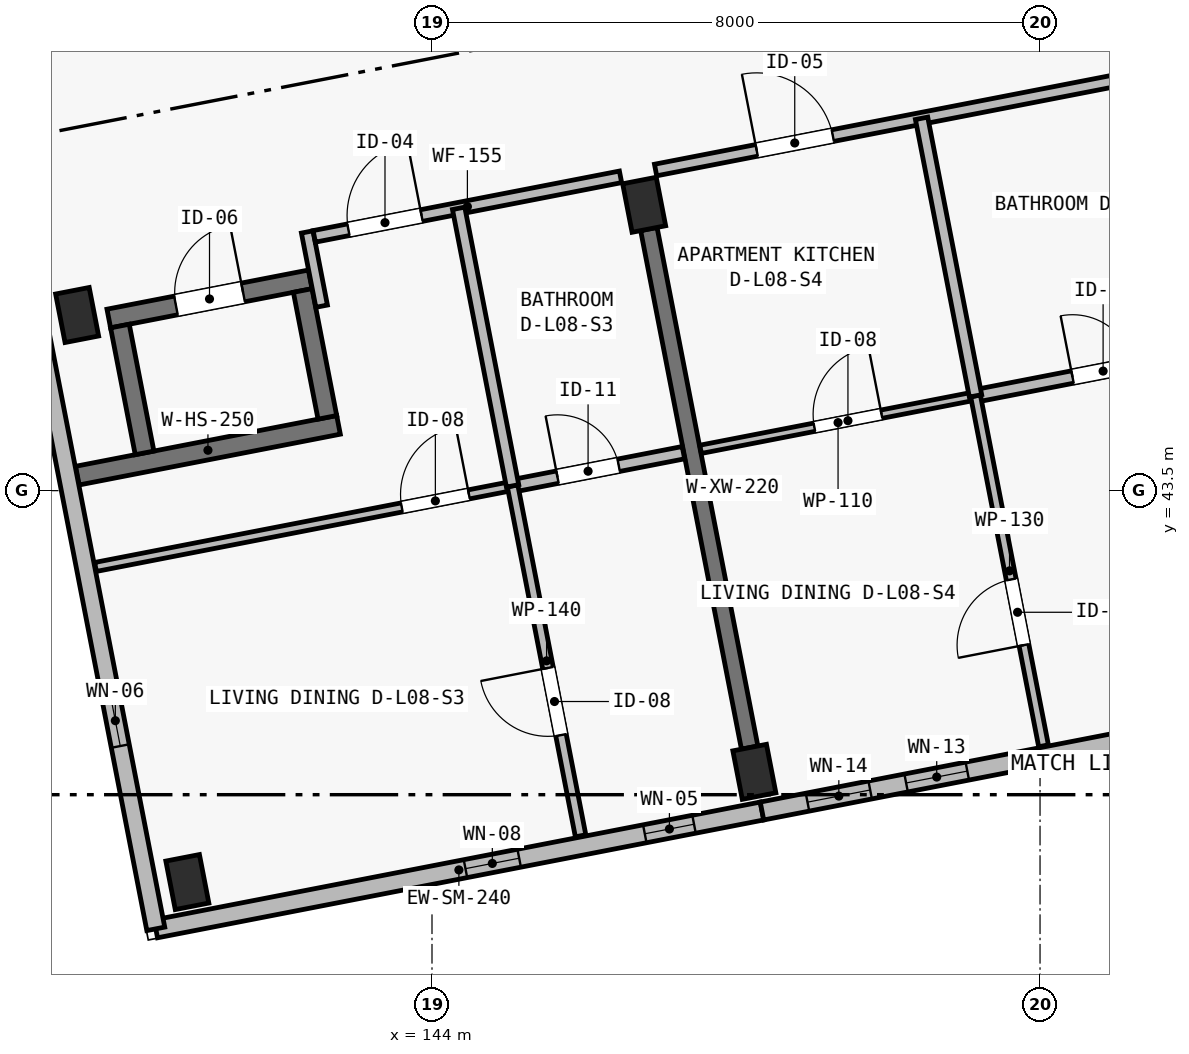
"""IFC4 building model, lengths in metres.
Left out: names, types, materials, properties, quantities, classifications, styles, units other than length and angle.
Written with IfcOpenShell. Run it as: python <this file> out.ifc"""

import sys

from ifc_helpers import new_model, si_unit, direction, frame, frame_2d, origin, origin_2d, place, context, subcontext, project, spatial, polyline, rectangle, outline, extrude, element, fill, save


model = new_model("IFC4")
c1 = context("Model", 3, precision=1e-05, world=origin(), true_north=direction((0.0, 1.0)))
c2 = subcontext(c1, "Body", "Model", "MODEL_VIEW")
j1 = project(units=[si_unit("LENGTHUNIT", "METRE"), si_unit("PLANEANGLEUNIT", "RADIAN")], contexts=[c1])
p1 = place(None, origin())
s1 = spatial("IfcSite", under=j1, at=p1, CompositionType="ELEMENT")
p2 = place(p1, origin())
s2 = spatial("IfcBuilding", under=s1, at=p2, CompositionType="ELEMENT")
p3 = place(p2, frame((0.0, 0.0, 27.9)))
s3 = spatial("IfcBuildingStorey", under=s2, at=p3, CompositionType="ELEMENT", Elevation=27.9)
for number, where, z_axis, x_axis in (
    (1, (140.781, 38.35, 0.0), (0.0, 0.0, 1.0), (0.982, 0.191, 0.0)),
    (2, (139.331, 45.811, 0.0), (0.0, 0.0, 1.0), (0.982, 0.191, 0.0)),
):
    element("IfcColumn", number, at=place(p3, frame(where, z_axis=z_axis, x_axis=x_axis)), inside=s3, PredefinedType="COLUMN", context=c2, shape_type="SweptSolid", body=[
        extrude(rectangle(XDim=0.45, YDim=0.65, at=origin_2d()), origin(), (0.0, 0.0, 1.0), 3.0),
    ])
for number, where, z_axis, x_axis in (
    (3, (148.241, 39.801, 0.0), (0.0, 0.0, 1.0), (0.982, 0.191, 0.0)),
    (4, (146.791, 47.261, 0.0), (0.0, 0.0, 1.0), (0.982, 0.191, 0.0)),
):
    element("IfcColumn", number, at=place(p3, frame(where, z_axis=z_axis, x_axis=x_axis)), inside=s3, PredefinedType="COLUMN", context=c2, shape_type="SweptSolid", body=[
        extrude(rectangle(XDim=0.45, YDim=0.65, at=origin_2d()), origin(), (0.0, 0.0, 1.0), 3.25),
    ])
p4 = place(p3, frame((148.179, 40.12, 0.0), z_axis=(0.0, 0.0, 1.0), x_axis=(-0.190817005532, 0.981625626397, 0.0)))
e5 = element("IfcWall", 5, at=p4, inside=s3, PredefinedType="SHEAR", context=c2, shape_type="SweptSolid", body=[
    extrude(rectangle(XDim=6.95, YDim=0.22, at=frame_2d((3.475, 0.0))), origin(), (0.0, 0.0, 1.0), 2.5),
])
p5 = place(p3, frame((139.334, 43.698, 0.0), z_axis=(0.0, 0.0, 1.0), x_axis=(0.981620834598, 0.190841654477, 0.0)))
e6 = element("IfcWall", 6, at=p5, inside=s3, PredefinedType="SHEAR", context=c2, shape_type="SweptSolid", body=[
    extrude(rectangle(XDim=3.5, YDim=0.25, at=frame_2d((1.75, 0.0))), origin(), (0.0, 0.0, 1.0), 3.183),
])
p6 = place(p3, frame((139.748, 45.764, 0.0), z_axis=(0.0, 0.0, 1.0), x_axis=(0.981630445883, 0.190792210834, 0.0)))
e7 = element("IfcWall", 7, at=p6, inside=s3, PredefinedType="SHEAR", context=c2, shape_type="SweptSolid", body=[
    extrude(rectangle(XDim=2.7, YDim=0.25, at=frame_2d((1.35, 0.0))), origin(), (0.0, 0.0, 1.0), 3.183),
])
p7 = place(p6, frame((0.9, 0.0, 0.0)))
e8 = element("IfcOpeningElement", 8, at=p7, cuts=e7, PredefinedType="OPENING", context=c2, shape_type="SweptSolid", body=[
    extrude(rectangle(XDim=0.9, YDim=2.05, at=frame_2d((0.45, 1.025))), frame((0.0, 0.14, 0.0), z_axis=(0.0, -1.0, 0.0), x_axis=(1.0, 0.0, 0.0)), (0.0, 0.0, 1.0), 0.28),
])
for number, where, z_axis, x_axis in (
    (9, (140.218, 43.997, 0.0), (0.0, 0.0, 1.0), (-0.191, 0.982, 0.0)),
    (10, (142.623, 44.464, 0.0), (0.0, 0.0, 1.0), (-0.191, 0.982, 0.0)),
):
    element("IfcWall", number, at=place(p3, frame(where, z_axis=z_axis, x_axis=x_axis)), inside=s3, PredefinedType="SHEAR", context=c2, shape_type="SweptSolid", body=[
        extrude(rectangle(XDim=1.7, YDim=0.25, at=frame_2d((0.85, 0.0))), origin(), (0.0, 0.0, 1.0), 3.183),
    ])
p8 = place(p3, frame((148.342, 39.285, 0.0), z_axis=(0.0, 0.0, 1.0), x_axis=(-0.981627273155, -0.190808533872, 0.0)))
e11 = element("IfcWall", 11, at=p8, inside=s3, PredefinedType="SOLIDWALL", context=c2, shape_type="SweptSolid", body=[
    extrude(outline(polyline([(0.0, 0.0), (8.125, 0.0), (8.125, 3.305), (0.0, 4.987), (0.0, 0.0)])), frame((0.0, 0.12, 0.0), z_axis=(0.0, -1.0, 0.0), x_axis=(1.0, 0.0, 0.0)), (0.0, 0.0, 1.0), 0.24),
])
p9 = place(p8, frame((0.911, 0.0, 0.52)))
e12 = element("IfcOpeningElement", 12, at=p9, cuts=e11, PredefinedType="OPENING", context=c2, shape_type="SweptSolid", body=[
    extrude(rectangle(XDim=0.66, YDim=2.32, at=frame_2d((0.33, 1.16))), frame((0.0, 0.135, 0.0), z_axis=(0.0, -1.0, 0.0), x_axis=(1.0, 0.0, 0.0)), (0.0, 0.0, 1.0), 0.27),
])
p10 = place(p8, frame((3.254, 0.0, 0.52)))
e13 = element("IfcOpeningElement", 13, at=p10, cuts=e11, PredefinedType="OPENING", context=c2, shape_type="SweptSolid", body=[
    extrude(rectangle(XDim=0.72, YDim=2.16, at=frame_2d((0.36, 1.08))), frame((0.0, 0.135, 0.0), z_axis=(0.0, -1.0, 0.0), x_axis=(1.0, 0.0, 0.0)), (0.0, 0.0, 1.0), 0.27),
])
p11 = place(p3, frame((155.802, 40.735, 0.0), z_axis=(0.0, 0.0, 1.0), x_axis=(-0.981626422232, -0.190812911449, 0.0)))
e14 = element("IfcWall", 14, at=p11, inside=s3, PredefinedType="SOLIDWALL", context=c2, shape_type="SweptSolid", body=[
    extrude(outline(polyline([(0.0, 0.0), (7.6, 0.0), (7.6, 4.987), (0.0, 6.56), (0.0, 0.0)])), frame((0.0, 0.12, 0.0), z_axis=(0.0, -1.0, 0.0), x_axis=(1.0, 0.0, 0.0)), (0.0, 0.0, 1.0), 0.24),
])
p12 = place(p11, frame((0.82, 0.0, 0.42)))
e15 = element("IfcOpeningElement", 15, at=p12, cuts=e14, PredefinedType="OPENING", context=c2, shape_type="SweptSolid", body=[
    extrude(rectangle(XDim=0.76, YDim=2.34, at=frame_2d((0.38, 1.17))), frame((0.0, 0.135, 0.0), z_axis=(0.0, -1.0, 0.0), x_axis=(1.0, 0.0, 0.0)), (0.0, 0.0, 1.0), 0.27),
])
p13 = place(p11, frame((4.848, 0.0, 0.42)))
e16 = element("IfcOpeningElement", 16, at=p13, cuts=e14, PredefinedType="OPENING", context=c2, shape_type="SweptSolid", body=[
    extrude(rectangle(XDim=0.82, YDim=2.18, at=frame_2d((0.41, 1.09))), frame((0.0, 0.135, 0.0), z_axis=(0.0, -1.0, 0.0), x_axis=(1.0, 0.0, 0.0)), (0.0, 0.0, 1.0), 0.27),
])
p14 = place(p11, frame((6.15, 0.0, 0.48)))
e17 = element("IfcOpeningElement", 17, at=p14, cuts=e14, PredefinedType="OPENING", context=c2, shape_type="SweptSolid", body=[
    extrude(rectangle(XDim=0.84, YDim=2.28, at=frame_2d((0.42, 1.14))), frame((0.0, 0.135, 0.0), z_axis=(0.0, -1.0, 0.0), x_axis=(1.0, 0.0, 0.0)), (0.0, 0.0, 1.0), 0.27),
])
p15 = place(p3, frame((140.366, 37.735, 0.0), z_axis=(0.0, 0.0, 1.0), x_axis=(-0.190806686307, 0.981627632282, 0.0)))
e18 = element("IfcWall", 18, at=p15, inside=s3, PredefinedType="SOLIDWALL", context=c2, shape_type="SweptSolid", body=[
    extrude(rectangle(XDim=20.65, YDim=0.24, at=frame_2d((10.325, 0.0))), origin(), (0.0, 0.0, 1.0), 3.305),
])
p16 = place(p15, frame((2.45, 0.0, 0.45)))
e19 = element("IfcOpeningElement", 19, at=p16, cuts=e18, PredefinedType="OPENING", context=c2, shape_type="SweptSolid", body=[
    extrude(rectangle(XDim=0.68, YDim=2.24, at=frame_2d((0.34, 1.12))), frame((0.0, 0.135, 0.0), z_axis=(0.0, -1.0, 0.0), x_axis=(1.0, 0.0, 0.0)), (0.0, 0.0, 1.0), 0.27),
])
p17 = place(p15, frame((17.38, 0.0, 0.52)))
e20 = element("IfcOpeningElement", 20, at=p17, cuts=e18, PredefinedType="OPENING", context=c2, shape_type="SweptSolid", body=[
    extrude(rectangle(XDim=0.82, YDim=2.18, at=frame_2d((0.41, 1.09))), frame((0.0, 0.135, 0.0), z_axis=(0.0, -1.0, 0.0), x_axis=(1.0, 0.0, 0.0)), (0.0, 0.0, 1.0), 0.27),
])
p18 = place(p3, frame((142.548, 45.927, 0.0), z_axis=(0.0, 0.0, 1.0), x_axis=(-0.190639805817, 0.981660055436, 0.0)))
e21 = element("IfcWall", 21, at=p18, inside=s3, PredefinedType="PARTITIONING", context=c2, shape_type="SweptSolid", body=[
    extrude(rectangle(XDim=0.995, YDim=0.155, at=frame_2d((0.498, 0.0))), origin(), (0.0, 0.0, 1.0), 3.15),
])
p19 = place(p3, frame((142.451, 46.845, 0.0), z_axis=(0.0, 0.0, 1.0), x_axis=(0.981629934904, 0.190794839817, 0.0)))
e22 = element("IfcWall", 22, at=p19, inside=s3, PredefinedType="PARTITIONING", context=c2, shape_type="SweptSolid", body=[
    extrude(rectangle(XDim=4.105, YDim=0.155, at=frame_2d((2.052, 0.0))), origin(), (0.0, 0.0, 1.0), 3.15),
])
p20 = place(p19, frame((0.458, 0.0, 0.0)))
e23 = element("IfcOpeningElement", 23, at=p20, cuts=e22, PredefinedType="OPENING", context=c2, shape_type="SweptSolid", body=[
    extrude(rectangle(XDim=0.98, YDim=2.15, at=frame_2d((0.49, 1.075))), frame((0.0, 0.093, 0.0), z_axis=(0.0, -1.0, 0.0), x_axis=(1.0, 0.0, 0.0)), (0.0, 0.0, 1.0), 0.185),
])
p21 = place(p3, frame((139.573, 42.496, 0.0), z_axis=(0.0, 0.0, 1.0), x_axis=(0.981624708273, 0.190821728607, 0.0)))
e24 = element("IfcWall", 24, at=p21, inside=s3, PredefinedType="PARTITIONING", context=c2, shape_type="SweptSolid", body=[
    extrude(rectangle(XDim=5.59, YDim=0.12, at=frame_2d((2.795, 0.0))), origin(), (0.0, 0.0, 1.0), 3.15),
])
p22 = place(p21, frame((4.105, 0.0, 0.0)))
e25 = element("IfcOpeningElement", 25, at=p22, cuts=e24, PredefinedType="OPENING", context=c2, shape_type="SweptSolid", body=[
    extrude(rectangle(XDim=0.9, YDim=2.1, at=frame_2d((0.45, 1.05))), frame((0.0, 0.075, 0.0), z_axis=(0.0, -1.0, 0.0), x_axis=(1.0, 0.0, 0.0)), (0.0, 0.0, 1.0), 0.15),
])
p23 = place(p3, frame((145.06, 43.563, 0.0), z_axis=(0.0, 0.0, 1.0), x_axis=(0.981624265801, 0.190824004755, 0.0)))
e26 = element("IfcWall", 26, at=p23, inside=s3, PredefinedType="PLUMBINGWALL", context=c2, shape_type="SweptSolid", body=[
    extrude(rectangle(XDim=2.29, YDim=0.165, at=frame_2d((1.145, 0.0))), origin(), (0.0, 0.0, 1.0), 3.15),
])
p24 = place(p23, frame((0.602, 0.0, 0.0)))
e27 = element("IfcOpeningElement", 27, at=p24, cuts=e26, PredefinedType="OPENING", context=c2, shape_type="SweptSolid", body=[
    extrude(rectangle(XDim=0.82, YDim=2.08, at=frame_2d((0.41, 1.04))), frame((0.0, 0.097, 0.0), z_axis=(0.0, -1.0, 0.0), x_axis=(1.0, 0.0, 0.0)), (0.0, 0.0, 1.0), 0.195),
])
p25 = place(p3, frame((145.955, 38.959, 0.0), z_axis=(0.0, 0.0, 1.0), x_axis=(-0.190837612577, 0.981621620394, 0.0)))
e28 = element("IfcWall", 28, at=p25, inside=s3, PredefinedType="PARTITIONING", context=c2, shape_type="SweptSolid", body=[
    extrude(rectangle(XDim=4.69, YDim=0.14, at=frame_2d((2.345, 0.0))), origin(), (0.0, 0.0, 1.0), 3.15),
])
p26 = place(p25, frame((1.35, 0.0, 0.0)))
e29 = element("IfcOpeningElement", 29, at=p26, cuts=e28, PredefinedType="OPENING", context=c2, shape_type="SweptSolid", body=[
    extrude(rectangle(XDim=0.9, YDim=2.1, at=frame_2d((0.45, 1.05))), frame((0.0, 0.085, 0.0), z_axis=(0.0, -1.0, 0.0), x_axis=(1.0, 0.0, 0.0)), (0.0, 0.0, 1.0), 0.17),
])
p27 = place(p3, frame((145.06, 43.563, 0.0), z_axis=(0.0, 0.0, 1.0), x_axis=(-0.190787096078, 0.981631439987, 0.0)))
e30 = element("IfcWall", 30, at=p27, inside=s3, PredefinedType="PLUMBINGWALL", context=c2, shape_type="SweptSolid", body=[
    extrude(rectangle(XDim=3.72, YDim=0.165, at=frame_2d((1.86, 0.0))), origin(), (0.0, 0.0, 1.0), 3.15),
])
p28 = place(p3, frame((146.942, 47.718, 0.0), z_axis=(0.0, 0.0, 1.0), x_axis=(0.981623942594, 0.190825667367, 0.0)))
e31 = element("IfcWall", 31, at=p28, inside=s3, PredefinedType="PARTITIONING", context=c2, shape_type="SweptSolid", body=[
    extrude(rectangle(XDim=7.13, YDim=0.155, at=frame_2d((3.565, 0.0))), origin(), (0.0, 0.0, 1.0), 3.15),
])
p29 = place(p28, frame((1.355, 0.0, 0.0)))
e32 = element("IfcOpeningElement", 32, at=p29, cuts=e31, PredefinedType="OPENING", context=c2, shape_type="SweptSolid", body=[
    extrude(rectangle(XDim=1.02, YDim=2.2, at=frame_2d((0.51, 1.1))), frame((0.0, 0.093, 0.0), z_axis=(0.0, -1.0, 0.0), x_axis=(1.0, 0.0, 0.0)), (0.0, 0.0, 1.0), 0.185),
])
p30 = place(p3, frame((147.534, 44.043, 0.0), z_axis=(0.0, 0.0, 1.0), x_axis=(0.981626422232, 0.190812911449, 0.0)))
e33 = element("IfcWall", 33, at=p30, inside=s3, PredefinedType="PARTITIONING", context=c2, shape_type="SweptSolid", body=[
    extrude(rectangle(XDim=3.685, YDim=0.11, at=frame_2d((1.842, 0.0))), origin(), (0.0, 0.0, 1.0), 3.15),
])
p31 = place(p30, frame((1.525, 0.0, 0.0)))
e34 = element("IfcOpeningElement", 34, at=p31, cuts=e33, PredefinedType="OPENING", context=c2, shape_type="SweptSolid", body=[
    extrude(rectangle(XDim=0.9, YDim=2.1, at=frame_2d((0.45, 1.05))), frame((0.0, 0.07, 0.0), z_axis=(0.0, -1.0, 0.0), x_axis=(1.0, 0.0, 0.0)), (0.0, 0.0, 1.0), 0.14),
])
p32 = place(p3, frame((151.151, 44.747, 0.0), z_axis=(0.0, 0.0, 1.0), x_axis=(0.981628834294, 0.190800502313, 0.0)))
e35 = element("IfcWall", 35, at=p32, inside=s3, PredefinedType="PLUMBINGWALL", context=c2, shape_type="SweptSolid", body=[
    extrude(rectangle(XDim=3.685, YDim=0.165, at=frame_2d((1.843, 0.0))), origin(), (0.0, 0.0, 1.0), 3.15),
])
p33 = place(p32, frame((1.3, 0.0, 0.0)))
e36 = element("IfcOpeningElement", 36, at=p33, cuts=e35, PredefinedType="OPENING", context=c2, shape_type="SweptSolid", body=[
    extrude(rectangle(XDim=0.82, YDim=2.08, at=frame_2d((0.41, 1.04))), frame((0.0, 0.097, 0.0), z_axis=(0.0, -1.0, 0.0), x_axis=(1.0, 0.0, 0.0)), (0.0, 0.0, 1.0), 0.195),
])
p34 = place(p3, frame((152.046, 40.143, 0.0), z_axis=(0.0, 0.0, 1.0), x_axis=(-0.190837612577, 0.981621620394, 0.0)))
e37 = element("IfcWall", 37, at=p34, inside=s3, PredefinedType="PARTITIONING", context=c2, shape_type="SweptSolid", body=[
    extrude(rectangle(XDim=4.69, YDim=0.13, at=frame_2d((2.345, 0.0))), origin(), (0.0, 0.0, 1.0), 3.15),
])
p35 = place(p34, frame((1.35, 0.0, 0.0)))
e38 = element("IfcOpeningElement", 38, at=p35, cuts=e37, PredefinedType="OPENING", context=c2, shape_type="SweptSolid", body=[
    extrude(rectangle(XDim=0.88, YDim=2.1, at=frame_2d((0.44, 1.05))), frame((0.0, 0.08, 0.0), z_axis=(0.0, -1.0, 0.0), x_axis=(1.0, 0.0, 0.0)), (0.0, 0.0, 1.0), 0.16),
])
p36 = place(p3, frame((151.151, 44.747, 0.0), z_axis=(0.0, 0.0, 1.0), x_axis=(-0.190774805453, 0.981633828678, 0.0)))
e39 = element("IfcWall", 39, at=p36, inside=s3, PredefinedType="PLUMBINGWALL", context=c2, shape_type="SweptSolid", body=[
    extrude(rectangle(XDim=3.72, YDim=0.165, at=frame_2d((1.86, 0.0))), origin(), (0.0, 0.0, 1.0), 3.15),
])
p37 = place(p9, origin())
e40 = element("IfcWindow", 40, at=p37, inside=s3, PartitioningType="SINGLE_PANEL", PredefinedType="WINDOW", context=c2, shape_type="SweptSolid", body=[
    extrude(rectangle(XDim=0.66, YDim=2.32, at=frame_2d((0.33, 1.16))), frame((0.0, 0.03, 0.0), z_axis=(0.0, -1.0, 0.0), x_axis=(1.0, 0.0, 0.0)), (0.0, 0.0, 1.0), 0.06),
])
fill(e12, e40)
p38 = place(p10, origin())
e41 = element("IfcWindow", 41, at=p38, inside=s3, PartitioningType="SINGLE_PANEL", PredefinedType="WINDOW", context=c2, shape_type="SweptSolid", body=[
    extrude(rectangle(XDim=0.72, YDim=2.16, at=frame_2d((0.36, 1.08))), frame((0.0, 0.03, 0.0), z_axis=(0.0, -1.0, 0.0), x_axis=(1.0, 0.0, 0.0)), (0.0, 0.0, 1.0), 0.06),
])
fill(e13, e41)
p39 = place(p13, origin())
e42 = element("IfcWindow", 42, at=p39, inside=s3, PartitioningType="SINGLE_PANEL", PredefinedType="WINDOW", context=c2, shape_type="SweptSolid", body=[
    extrude(rectangle(XDim=0.82, YDim=2.18, at=frame_2d((0.41, 1.09))), frame((0.0, 0.03, 0.0), z_axis=(0.0, -1.0, 0.0), x_axis=(1.0, 0.0, 0.0)), (0.0, 0.0, 1.0), 0.06),
])
fill(e16, e42)
p40 = place(p14, origin())
e43 = element("IfcWindow", 43, at=p40, inside=s3, PartitioningType="SINGLE_PANEL", PredefinedType="WINDOW", context=c2, shape_type="SweptSolid", body=[
    extrude(rectangle(XDim=0.84, YDim=2.28, at=frame_2d((0.42, 1.14))), frame((0.0, 0.03, 0.0), z_axis=(0.0, -1.0, 0.0), x_axis=(1.0, 0.0, 0.0)), (0.0, 0.0, 1.0), 0.06),
])
fill(e17, e43)
p41 = place(p16, origin())
e44 = element("IfcWindow", 44, at=p41, inside=s3, PartitioningType="SINGLE_PANEL", PredefinedType="WINDOW", context=c2, shape_type="SweptSolid", body=[
    extrude(rectangle(XDim=0.68, YDim=2.24, at=frame_2d((0.34, 1.12))), frame((0.0, 0.03, 0.0), z_axis=(0.0, -1.0, 0.0), x_axis=(1.0, 0.0, 0.0)), (0.0, 0.0, 1.0), 0.06),
])
fill(e19, e44)
p42 = place(p20, origin())
e45 = element("IfcDoor", 45, at=p42, inside=s3, OperationType="SINGLE_SWING_RIGHT", PredefinedType="DOOR", context=c2, shape_type="SweptSolid", body=[
    extrude(rectangle(XDim=0.98, YDim=2.15, at=frame_2d((0.49, 1.075))), frame((0.0, 0.025, 0.0), z_axis=(0.0, -1.0, 0.0), x_axis=(1.0, 0.0, 0.0)), (0.0, 0.0, 1.0), 0.05),
])
fill(e23, e45)
p43 = place(p22, origin())
e46 = element("IfcDoor", 46, at=p43, inside=s3, OperationType="SINGLE_SWING_RIGHT", PredefinedType="DOOR", context=c2, shape_type="SweptSolid", body=[
    extrude(rectangle(XDim=0.9, YDim=2.1, at=frame_2d((0.45, 1.05))), frame((0.0, 0.025, 0.0), z_axis=(0.0, -1.0, 0.0), x_axis=(1.0, 0.0, 0.0)), (0.0, 0.0, 1.0), 0.05),
])
fill(e25, e46)
p44 = place(p24, origin())
e47 = element("IfcDoor", 47, at=p44, inside=s3, OperationType="SINGLE_SWING_LEFT", PredefinedType="DOOR", context=c2, shape_type="SweptSolid", body=[
    extrude(rectangle(XDim=0.82, YDim=2.08, at=frame_2d((0.41, 1.04))), frame((0.0, 0.025, 0.0), z_axis=(0.0, -1.0, 0.0), x_axis=(1.0, 0.0, 0.0)), (0.0, 0.0, 1.0), 0.05),
])
fill(e27, e47)
p45 = place(p26, origin())
e48 = element("IfcDoor", 48, at=p45, inside=s3, OperationType="SINGLE_SWING_RIGHT", PredefinedType="DOOR", context=c2, shape_type="SweptSolid", body=[
    extrude(rectangle(XDim=0.9, YDim=2.1, at=frame_2d((0.45, 1.05))), frame((0.0, 0.025, 0.0), z_axis=(0.0, -1.0, 0.0), x_axis=(1.0, 0.0, 0.0)), (0.0, 0.0, 1.0), 0.05),
])
fill(e29, e48)
p46 = place(p29, origin())
e49 = element("IfcDoor", 49, at=p46, inside=s3, OperationType="SINGLE_SWING_LEFT", PredefinedType="DOOR", context=c2, shape_type="SweptSolid", body=[
    extrude(rectangle(XDim=1.02, YDim=2.2, at=frame_2d((0.51, 1.1))), frame((0.0, 0.025, 0.0), z_axis=(0.0, -1.0, 0.0), x_axis=(1.0, 0.0, 0.0)), (0.0, 0.0, 1.0), 0.05),
])
fill(e32, e49)
p47 = place(p31, origin())
e50 = element("IfcDoor", 50, at=p47, inside=s3, OperationType="SINGLE_SWING_RIGHT", PredefinedType="DOOR", context=c2, shape_type="SweptSolid", body=[
    extrude(rectangle(XDim=0.9, YDim=2.1, at=frame_2d((0.45, 1.05))), frame((0.0, 0.025, 0.0), z_axis=(0.0, -1.0, 0.0), x_axis=(1.0, 0.0, 0.0)), (0.0, 0.0, 1.0), 0.05),
])
fill(e34, e50)
p48 = place(p33, origin())
e51 = element("IfcDoor", 51, at=p48, inside=s3, OperationType="SINGLE_SWING_LEFT", PredefinedType="DOOR", context=c2, shape_type="SweptSolid", body=[
    extrude(rectangle(XDim=0.82, YDim=2.08, at=frame_2d((0.41, 1.04))), frame((0.0, 0.025, 0.0), z_axis=(0.0, -1.0, 0.0), x_axis=(1.0, 0.0, 0.0)), (0.0, 0.0, 1.0), 0.05),
])
fill(e36, e51)
p49 = place(p35, origin())
e52 = element("IfcDoor", 52, at=p49, inside=s3, OperationType="SINGLE_SWING_LEFT", PredefinedType="DOOR", context=c2, shape_type="SweptSolid", body=[
    extrude(rectangle(XDim=0.88, YDim=2.1, at=frame_2d((0.44, 1.05))), frame((0.0, 0.025, 0.0), z_axis=(0.0, -1.0, 0.0), x_axis=(1.0, 0.0, 0.0)), (0.0, 0.0, 1.0), 0.05),
])
fill(e38, e52)
p50 = place(p7, origin())
e53 = element("IfcDoor", 53, at=p50, inside=s3, OperationType="SINGLE_SWING_RIGHT", PredefinedType="DOOR", context=c2, shape_type="SweptSolid", body=[
    extrude(rectangle(XDim=0.9, YDim=2.05, at=frame_2d((0.45, 1.025))), frame((0.0, 0.025, 0.0), z_axis=(0.0, -1.0, 0.0), x_axis=(1.0, 0.0, 0.0)), (0.0, 0.0, 1.0), 0.05),
])
fill(e8, e53)
save(model, sys.argv[1])
